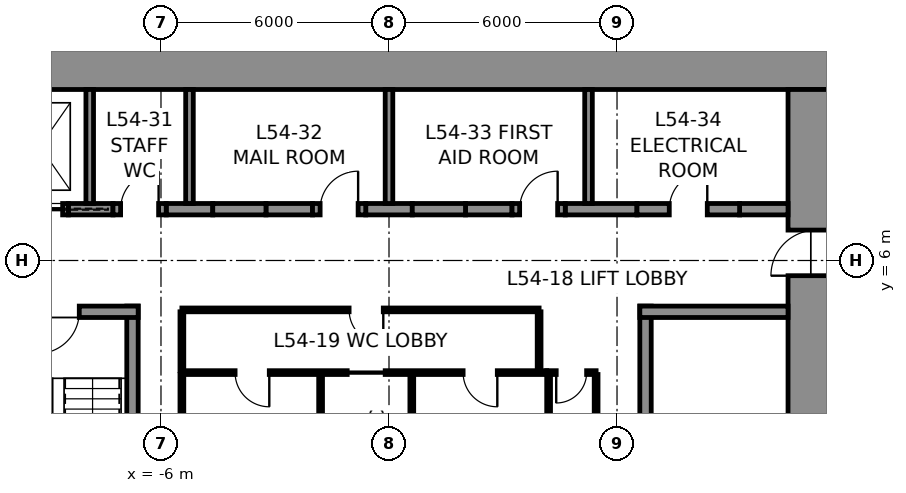
"""IFC4 building model, lengths in metres.
Left out: names, types, materials, properties, quantities, classifications, styles, units other than length and angle.
Written with IfcOpenShell. Run it as: python <this file> out.ifc"""

import sys

from ifc_helpers import new_model, si_unit, direction, frame, frame_2d, origin, place, context, subcontext, project, spatial, rectangle, extrude, element, fill, save


model = new_model("IFC4")
c1 = context("Model", 3, precision=1e-05, world=origin(), true_north=direction((0.0, 1.0)))
c2 = subcontext(c1, "Body", "Model", "MODEL_VIEW")
j1 = project(units=[si_unit("LENGTHUNIT", "METRE"), si_unit("PLANEANGLEUNIT", "RADIAN")], contexts=[c1])
p1 = place(None, origin())
s1 = spatial("IfcSite", under=j1, at=p1, CompositionType="ELEMENT")
p2 = place(p1, origin())
s2 = spatial("IfcBuilding", under=s1, at=p2, CompositionType="ELEMENT")
p3 = place(p2, frame((0.0, 0.0, 245.8)))
s3 = spatial("IfcBuildingStorey", under=s2, at=p3, CompositionType="ELEMENT", Elevation=245.8)
p4 = place(p3, frame((-12.0, 11.25, 0.0), z_axis=(0.0, 0.0, 1.0), x_axis=(1.0, 0.0, 0.0)))
e1 = element("IfcWall", 1, at=p4, inside=s3, PredefinedType="SHEAR", context=c2, shape_type="SweptSolid", body=[
    extrude(rectangle(XDim=24.0, YDim=1.5, at=frame_2d((12.0, 0.0))), origin(), (0.0, 0.0, 1.0), 4.0),
])
p5 = place(p3, frame((11.25, 10.5, 0.0), z_axis=(0.0, 0.0, 1.0), x_axis=(0.0, -1.0, 0.0)))
e2 = element("IfcWall", 2, at=p5, inside=s3, PredefinedType="SHEAR", context=c2, shape_type="SweptSolid", body=[
    extrude(rectangle(XDim=21.0, YDim=1.5, at=frame_2d((10.5, 0.0))), origin(), (0.0, 0.0, 1.0), 4.0),
])
p6 = place(p5, frame((3.7, 0.0, 0.0)))
e3 = element("IfcOpeningElement", 3, at=p6, cuts=e2, PredefinedType="OPENING", context=c2, shape_type="SweptSolid", body=[
    extrude(rectangle(XDim=1.2, YDim=2.3, at=frame_2d((0.6, 1.15))), frame((0.0, 0.76, 0.0), z_axis=(0.0, -1.0, 0.0), x_axis=(1.0, 0.0, 0.0)), (0.0, 0.0, 1.0), 1.52),
])
p7 = place(p5, frame((16.1, 0.0, 0.0)))
e4 = element("IfcOpeningElement", 4, at=p7, cuts=e2, PredefinedType="OPENING", context=c2, shape_type="SweptSolid", body=[
    extrude(rectangle(XDim=1.2, YDim=2.3, at=frame_2d((0.6, 1.15))), frame((0.0, 0.76, 0.0), z_axis=(0.0, -1.0, 0.0), x_axis=(1.0, 0.0, 0.0)), (0.0, 0.0, 1.0), 1.52),
])
p8 = place(p3, frame((-8.438, 7.35, 0.0), z_axis=(0.0, 0.0, 1.0), x_axis=(1.0, 0.0, 0.0)))
e5 = element("IfcWall", 5, at=p8, inside=s3, PredefinedType="SHEAR", context=c2, shape_type="SweptSolid", body=[
    extrude(rectangle(XDim=1.175, YDim=0.3, at=frame_2d((0.587, 0.0))), origin(), (0.0, 0.0, 1.0), 4.0),
])
for number, where, z_axis, x_axis in (
    (6, (-5.863, 7.35, 0.0), (0.0, 0.0, 1.0), (1.0, 0.0, 0.0)),
    (7, (-3.238, 7.35, 0.0), (0.0, 0.0, 1.0), (1.0, 0.0, 0.0)),
    (8, (-0.613, 7.35, 0.0), (0.0, 0.0, 1.0), (1.0, 0.0, 0.0)),
    (9, (2.012, 7.35, 0.0), (0.0, 0.0, 1.0), (1.0, 0.0, 0.0)),
):
    element("IfcWall", number, at=place(p3, frame(where, z_axis=z_axis, x_axis=x_axis)), inside=s3, PredefinedType="SHEAR", context=c2, shape_type="SweptSolid", body=[
        extrude(rectangle(XDim=1.225, YDim=0.3, at=frame_2d((0.613, 0.0))), origin(), (0.0, 0.0, 1.0), 4.0),
    ])
p9 = place(p3, frame((4.637, 7.35, 0.0), z_axis=(0.0, 0.0, 1.0), x_axis=(1.0, 0.0, 0.0)))
e10 = element("IfcWall", 10, at=p9, inside=s3, PredefinedType="SHEAR", context=c2, shape_type="SweptSolid", body=[
    extrude(rectangle(XDim=1.887, YDim=0.3, at=frame_2d((0.944, 0.0))), origin(), (0.0, 0.0, 1.0), 4.0),
])
p10 = place(p3, frame((9.225, 7.35, 0.0), z_axis=(0.0, 0.0, 1.0), x_axis=(1.0, 0.0, 0.0)))
e11 = element("IfcWall", 11, at=p10, inside=s3, PredefinedType="SHEAR", context=c2, shape_type="SweptSolid", body=[
    extrude(rectangle(XDim=1.275, YDim=0.3, at=frame_2d((0.637, 0.0))), origin(), (0.0, 0.0, 1.0), 4.0),
])
p11 = place(p3, frame((-9.938, 7.35, 0.0), z_axis=(0.0, 0.0, 1.0), x_axis=(1.0, 0.0, 0.0)))
e12 = element("IfcWall", 12, at=p11, inside=s3, PredefinedType="PARTITIONING", context=c2, shape_type="SweptSolid", body=[
    extrude(rectangle(XDim=1.5, YDim=0.3, at=frame_2d((0.75, 0.0))), origin(), (0.0, 0.0, 1.0), 4.0),
])
p12 = place(p11, frame((0.15, 0.0, 0.0)))
e13 = element("IfcOpeningElement", 13, at=p12, cuts=e12, PredefinedType="OPENING", context=c2, shape_type="SweptSolid", body=[
    extrude(rectangle(XDim=1.2, YDim=2.3, at=frame_2d((0.6, 1.15))), frame((0.0, 0.16, 0.0), z_axis=(0.0, -1.0, 0.0), x_axis=(1.0, 0.0, 0.0)), (0.0, 0.0, 1.0), 0.32),
])
p13 = place(p3, frame((-7.262, 7.35, 0.0), z_axis=(0.0, 0.0, 1.0), x_axis=(1.0, 0.0, 0.0)))
e14 = element("IfcWall", 14, at=p13, inside=s3, PredefinedType="PARTITIONING", context=c2, shape_type="SweptSolid", body=[
    extrude(rectangle(XDim=1.4, YDim=0.3, at=frame_2d((0.7, 0.0))), origin(), (0.0, 0.0, 1.0), 4.0),
])
p14 = place(p13, frame((0.2, 0.0, 0.0)))
e15 = element("IfcOpeningElement", 15, at=p14, cuts=e14, PredefinedType="OPENING", context=c2, shape_type="SweptSolid", body=[
    extrude(rectangle(XDim=1.0, YDim=2.3, at=frame_2d((0.5, 1.15))), frame((0.0, 0.16, 0.0), z_axis=(0.0, -1.0, 0.0), x_axis=(1.0, 0.0, 0.0)), (0.0, 0.0, 1.0), 0.32),
])
p15 = place(p3, frame((-4.637, 7.35, 0.0), z_axis=(0.0, 0.0, 1.0), x_axis=(1.0, 0.0, 0.0)))
e16 = element("IfcWall", 16, at=p15, inside=s3, PredefinedType="PARTITIONING", context=c2, shape_type="SweptSolid", body=[
    extrude(rectangle(XDim=1.4, YDim=0.3, at=frame_2d((0.7, 0.0))), origin(), (0.0, 0.0, 1.0), 4.0),
])
p16 = place(p3, frame((-2.012, 7.35, 0.0), z_axis=(0.0, 0.0, 1.0), x_axis=(1.0, 0.0, 0.0)))
e17 = element("IfcWall", 17, at=p16, inside=s3, PredefinedType="PARTITIONING", context=c2, shape_type="SweptSolid", body=[
    extrude(rectangle(XDim=1.4, YDim=0.3, at=frame_2d((0.7, 0.0))), origin(), (0.0, 0.0, 1.0), 4.0),
])
p17 = place(p16, frame((0.2, 0.0, 0.0)))
e18 = element("IfcOpeningElement", 18, at=p17, cuts=e17, PredefinedType="OPENING", context=c2, shape_type="SweptSolid", body=[
    extrude(rectangle(XDim=1.0, YDim=2.3, at=frame_2d((0.5, 1.15))), frame((0.0, 0.16, 0.0), z_axis=(0.0, -1.0, 0.0), x_axis=(1.0, 0.0, 0.0)), (0.0, 0.0, 1.0), 0.32),
])
p18 = place(p3, frame((0.613, 7.35, 0.0), z_axis=(0.0, 0.0, 1.0), x_axis=(1.0, 0.0, 0.0)))
e19 = element("IfcWall", 19, at=p18, inside=s3, PredefinedType="PARTITIONING", context=c2, shape_type="SweptSolid", body=[
    extrude(rectangle(XDim=1.4, YDim=0.3, at=frame_2d((0.7, 0.0))), origin(), (0.0, 0.0, 1.0), 4.0),
])
p19 = place(p3, frame((3.238, 7.35, 0.0), z_axis=(0.0, 0.0, 1.0), x_axis=(1.0, 0.0, 0.0)))
e20 = element("IfcWall", 20, at=p19, inside=s3, PredefinedType="PARTITIONING", context=c2, shape_type="SweptSolid", body=[
    extrude(rectangle(XDim=1.4, YDim=0.3, at=frame_2d((0.7, 0.0))), origin(), (0.0, 0.0, 1.0), 4.0),
])
p20 = place(p19, frame((0.2, 0.0, 0.0)))
e21 = element("IfcOpeningElement", 21, at=p20, cuts=e20, PredefinedType="OPENING", context=c2, shape_type="SweptSolid", body=[
    extrude(rectangle(XDim=1.0, YDim=2.3, at=frame_2d((0.5, 1.15))), frame((0.0, 0.16, 0.0), z_axis=(0.0, -1.0, 0.0), x_axis=(1.0, 0.0, 0.0)), (0.0, 0.0, 1.0), 0.32),
])
p21 = place(p3, frame((6.525, 7.35, 0.0), z_axis=(0.0, 0.0, 1.0), x_axis=(1.0, 0.0, 0.0)))
e22 = element("IfcWall", 22, at=p21, inside=s3, PredefinedType="PARTITIONING", context=c2, shape_type="SweptSolid", body=[
    extrude(rectangle(XDim=2.7, YDim=0.3, at=frame_2d((1.35, 0.0))), origin(), (0.0, 0.0, 1.0), 4.0),
])
p22 = place(p21, frame((0.85, 0.0, 0.0)))
e23 = element("IfcOpeningElement", 23, at=p22, cuts=e22, PredefinedType="OPENING", context=c2, shape_type="SweptSolid", body=[
    extrude(rectangle(XDim=1.0, YDim=2.3, at=frame_2d((0.5, 1.15))), frame((0.0, 0.16, 0.0), z_axis=(0.0, -1.0, 0.0), x_axis=(1.0, 0.0, 0.0)), (0.0, 0.0, 1.0), 0.32),
])
for number, where, z_axis, x_axis in (
    (24, (-7.875, 7.5, 0.0), (0.0, 0.0, 1.0), (0.0, 1.0, 0.0)),
    (25, (-5.25, 7.5, 0.0), (0.0, 0.0, 1.0), (0.0, 1.0, 0.0)),
    (26, (0.0, 7.5, 0.0), (0.0, 0.0, 1.0), (0.0, 1.0, 0.0)),
    (27, (5.25, 7.5, 0.0), (0.0, 0.0, 1.0), (0.0, 1.0, 0.0)),
):
    element("IfcWall", number, at=place(p3, frame(where, z_axis=z_axis, x_axis=x_axis)), inside=s3, PredefinedType="PARTITIONING", context=c2, shape_type="SweptSolid", body=[
        extrude(rectangle(XDim=3.0, YDim=0.2, at=frame_2d((1.5, 0.0))), origin(), (0.0, 0.0, 1.0), 4.0),
    ])
p23 = place(p3, frame((-6.75, -4.8, 0.0), z_axis=(0.0, 0.0, 1.0), x_axis=(0.0, 1.0, 0.0)))
e28 = element("IfcWall", 28, at=p23, inside=s3, PredefinedType="SOLIDWALL", context=c2, shape_type="SweptSolid", body=[
    extrude(rectangle(XDim=9.6, YDim=0.3, at=frame_2d((4.8, 0.0))), origin(), (0.0, 0.0, 1.0), 3.75),
])
p24 = place(p3, frame((-10.5, 4.65, 0.0), z_axis=(0.0, 0.0, 1.0), x_axis=(1.0, 0.0, 0.0)))
e29 = element("IfcWall", 29, at=p24, inside=s3, PredefinedType="SOLIDWALL", context=c2, shape_type="SweptSolid", body=[
    extrude(rectangle(XDim=3.9, YDim=0.3, at=frame_2d((1.95, 0.0))), origin(), (0.0, 0.0, 1.0), 3.75),
])
p25 = place(p24, frame((1.25, 0.0, 0.0)))
e30 = element("IfcOpeningElement", 30, at=p25, cuts=e29, PredefinedType="OPENING", context=c2, shape_type="SweptSolid", body=[
    extrude(rectangle(XDim=1.1, YDim=2.3, at=frame_2d((0.55, 1.15))), frame((0.0, 0.16, 0.0), z_axis=(0.0, -1.0, 0.0), x_axis=(1.0, 0.0, 0.0)), (0.0, 0.0, 1.0), 0.32),
])
p26 = place(p3, frame((6.75, -4.8, 0.0), z_axis=(0.0, 0.0, 1.0), x_axis=(0.0, 1.0, 0.0)))
e31 = element("IfcWall", 31, at=p26, inside=s3, PredefinedType="SOLIDWALL", context=c2, shape_type="SweptSolid", body=[
    extrude(rectangle(XDim=9.6, YDim=0.3, at=frame_2d((4.8, 0.0))), origin(), (0.0, 0.0, 1.0), 3.75),
])
p27 = place(p3, frame((6.6, 4.65, 0.0), z_axis=(0.0, 0.0, 1.0), x_axis=(1.0, 0.0, 0.0)))
e32 = element("IfcWall", 32, at=p27, inside=s3, PredefinedType="SOLIDWALL", context=c2, shape_type="SweptSolid", body=[
    extrude(rectangle(XDim=3.9, YDim=0.3, at=frame_2d((1.95, 0.0))), origin(), (0.0, 0.0, 1.0), 3.75),
])
p28 = place(p3, frame((-5.45, 3.05, 0.0), z_axis=(0.0, 0.0, 1.0), x_axis=(1.0, 0.0, 0.0)))
e33 = element("IfcWall", 33, at=p28, inside=s3, PredefinedType="PARTITIONING", context=c2, shape_type="SweptSolid", body=[
    extrude(rectangle(XDim=9.6, YDim=0.1, at=frame_2d((4.8, 0.0))), origin(), (0.0, 0.0, 1.0), 3.75),
])
p29 = place(p28, frame((1.4, 0.0, 0.0)))
e34 = element("IfcOpeningElement", 34, at=p29, cuts=e33, PredefinedType="OPENING", context=c2, shape_type="SweptSolid", body=[
    extrude(rectangle(XDim=0.9, YDim=2.3, at=frame_2d((0.45, 1.15))), frame((0.0, 0.06, 0.0), z_axis=(0.0, -1.0, 0.0), x_axis=(1.0, 0.0, 0.0)), (0.0, 0.0, 1.0), 0.12),
])
p30 = place(p28, frame((4.35, 0.0, 0.0)))
e35 = element("IfcOpeningElement", 35, at=p30, cuts=e33, PredefinedType="OPENING", context=c2, shape_type="SweptSolid", body=[
    extrude(rectangle(XDim=1.0, YDim=2.3, at=frame_2d((0.5, 1.15))), frame((0.0, 0.06, 0.0), z_axis=(0.0, -1.0, 0.0), x_axis=(1.0, 0.0, 0.0)), (0.0, 0.0, 1.0), 0.12),
])
p31 = place(p28, frame((7.4, 0.0, 0.0)))
e36 = element("IfcOpeningElement", 36, at=p31, cuts=e33, PredefinedType="OPENING", context=c2, shape_type="SweptSolid", body=[
    extrude(rectangle(XDim=0.9, YDim=2.3, at=frame_2d((0.45, 1.15))), frame((0.0, 0.06, 0.0), z_axis=(0.0, -1.0, 0.0), x_axis=(1.0, 0.0, 0.0)), (0.0, 0.0, 1.0), 0.12),
])
p32 = place(p3, frame((4.15, 3.05, 0.0), z_axis=(0.0, 0.0, 1.0), x_axis=(1.0, 0.0, 0.0)))
e37 = element("IfcWall", 37, at=p32, inside=s3, PredefinedType="PARTITIONING", context=c2, shape_type="SweptSolid", body=[
    extrude(rectangle(XDim=1.3, YDim=0.1, at=frame_2d((0.65, 0.0))), origin(), (0.0, 0.0, 1.0), 3.75),
])
p33 = place(p32, frame((0.25, 0.0, 0.0)))
e38 = element("IfcOpeningElement", 38, at=p33, cuts=e37, PredefinedType="OPENING", context=c2, shape_type="SweptSolid", body=[
    extrude(rectangle(XDim=0.8, YDim=2.3, at=frame_2d((0.4, 1.15))), frame((0.0, 0.06, 0.0), z_axis=(0.0, -1.0, 0.0), x_axis=(1.0, 0.0, 0.0)), (0.0, 0.0, 1.0), 0.12),
])
for number, where, z_axis, x_axis in (
    (39, (5.45, 3.0, 0.0), (0.0, 0.0, 1.0), (0.0, -1.0, 0.0)),
    (40, (-5.45, -3.0, 0.0), (0.0, 0.0, 1.0), (0.0, 1.0, 0.0)),
    (41, (-1.8, -3.0, 0.0), (0.0, 0.0, 1.0), (0.0, 1.0, 0.0)),
    (42, (0.6, -3.0, 0.0), (0.0, 0.0, 1.0), (0.0, 1.0, 0.0)),
    (43, (4.2, -3.0, 0.0), (0.0, 0.0, 1.0), (0.0, 1.0, 0.0)),
):
    element("IfcWall", number, at=place(p3, frame(where, z_axis=z_axis, x_axis=x_axis)), inside=s3, PredefinedType="PARTITIONING", context=c2, shape_type="SweptSolid", body=[
        extrude(rectangle(XDim=6.0, YDim=0.1, at=frame_2d((3.0, 0.0))), origin(), (0.0, 0.0, 1.0), 3.75),
    ])
p34 = place(p3, frame((-5.45, 4.7, 0.0), z_axis=(0.0, 0.0, 1.0), x_axis=(1.0, 0.0, 0.0)))
e44 = element("IfcWall", 44, at=p34, inside=s3, PredefinedType="PARTITIONING", context=c2, shape_type="SweptSolid", body=[
    extrude(rectangle(XDim=9.4, YDim=0.1, at=frame_2d((4.7, 0.0))), origin(), (0.0, 0.0, 1.0), 3.75),
])
p35 = place(p34, frame((4.4, 0.0, 0.0)))
e45 = element("IfcOpeningElement", 45, at=p35, cuts=e44, PredefinedType="OPENING", context=c2, shape_type="SweptSolid", body=[
    extrude(rectangle(XDim=0.9, YDim=2.3, at=frame_2d((0.45, 1.15))), frame((0.0, 0.06, 0.0), z_axis=(0.0, -1.0, 0.0), x_axis=(1.0, 0.0, 0.0)), (0.0, 0.0, 1.0), 0.12),
])
for number, where, z_axis, x_axis in (
    (46, (-5.45, 3.1, 0.0), (0.0, 0.0, 1.0), (0.0, 1.0, 0.0)),
    (47, (3.95, 3.1, 0.0), (0.0, 0.0, 1.0), (0.0, 1.0, 0.0)),
):
    element("IfcWall", number, at=place(p3, frame(where, z_axis=z_axis, x_axis=x_axis)), inside=s3, PredefinedType="PARTITIONING", context=c2, shape_type="SweptSolid", body=[
        extrude(rectangle(XDim=1.55, YDim=0.1, at=frame_2d((0.775, 0.0))), origin(), (0.0, 0.0, 1.0), 3.75),
    ])
p36 = place(p25, frame((1.1, 0.0, 0.0), z_axis=(0.0, 0.0, 1.0), x_axis=(-1.0, 0.0, 0.0)))
e48 = element("IfcDoor", 48, at=p36, inside=s3, OperationType="SINGLE_SWING_RIGHT", PredefinedType="DOOR", context=c2, shape_type="SweptSolid", body=[
    extrude(rectangle(XDim=1.1, YDim=2.3, at=frame_2d((0.55, 1.15))), frame((0.0, 0.025, 0.0), z_axis=(0.0, -1.0, 0.0), x_axis=(1.0, 0.0, 0.0)), (0.0, 0.0, 1.0), 0.05),
])
fill(e30, e48)
p37 = place(p29, frame((0.9, 0.0, 0.0), z_axis=(0.0, 0.0, 1.0), x_axis=(-1.0, 0.0, 0.0)))
e49 = element("IfcDoor", 49, at=p37, inside=s3, OperationType="SINGLE_SWING_LEFT", PredefinedType="DOOR", context=c2, shape_type="SweptSolid", body=[
    extrude(rectangle(XDim=0.9, YDim=2.3, at=frame_2d((0.45, 1.15))), frame((0.0, 0.025, 0.0), z_axis=(0.0, -1.0, 0.0), x_axis=(1.0, 0.0, 0.0)), (0.0, 0.0, 1.0), 0.05),
])
fill(e34, e49)
p38 = place(p30, frame((1.0, 0.0, 0.0), z_axis=(0.0, 0.0, 1.0), x_axis=(-1.0, 0.0, 0.0)))
e50 = element("IfcDoor", 50, at=p38, inside=s3, OperationType="SLIDING_TO_LEFT", PredefinedType="DOOR", context=c2, shape_type="SweptSolid", body=[
    extrude(rectangle(XDim=1.0, YDim=2.3, at=frame_2d((0.5, 1.15))), frame((0.0, 0.025, 0.0), z_axis=(0.0, -1.0, 0.0), x_axis=(1.0, 0.0, 0.0)), (0.0, 0.0, 1.0), 0.05),
])
fill(e35, e50)
p39 = place(p31, frame((0.9, 0.0, 0.0), z_axis=(0.0, 0.0, 1.0), x_axis=(-1.0, 0.0, 0.0)))
e51 = element("IfcDoor", 51, at=p39, inside=s3, OperationType="SINGLE_SWING_LEFT", PredefinedType="DOOR", context=c2, shape_type="SweptSolid", body=[
    extrude(rectangle(XDim=0.9, YDim=2.3, at=frame_2d((0.45, 1.15))), frame((0.0, 0.025, 0.0), z_axis=(0.0, -1.0, 0.0), x_axis=(1.0, 0.0, 0.0)), (0.0, 0.0, 1.0), 0.05),
])
fill(e36, e51)
p40 = place(p33, frame((0.8, 0.0, 0.0), z_axis=(0.0, 0.0, 1.0), x_axis=(-1.0, 0.0, 0.0)))
e52 = element("IfcDoor", 52, at=p40, inside=s3, OperationType="SINGLE_SWING_RIGHT", PredefinedType="DOOR", context=c2, shape_type="SweptSolid", body=[
    extrude(rectangle(XDim=0.8, YDim=2.3, at=frame_2d((0.4, 1.15))), frame((0.0, 0.025, 0.0), z_axis=(0.0, -1.0, 0.0), x_axis=(1.0, 0.0, 0.0)), (0.0, 0.0, 1.0), 0.05),
])
fill(e38, e52)
p41 = place(p35, frame((0.9, 0.0, 0.0), z_axis=(0.0, 0.0, 1.0), x_axis=(-1.0, 0.0, 0.0)))
e53 = element("IfcDoor", 53, at=p41, inside=s3, OperationType="SINGLE_SWING_LEFT", PredefinedType="DOOR", context=c2, shape_type="SweptSolid", body=[
    extrude(rectangle(XDim=0.9, YDim=2.3, at=frame_2d((0.45, 1.15))), frame((0.0, 0.025, 0.0), z_axis=(0.0, -1.0, 0.0), x_axis=(1.0, 0.0, 0.0)), (0.0, 0.0, 1.0), 0.05),
])
fill(e45, e53)
p42 = place(p14, origin())
e54 = element("IfcDoor", 54, at=p42, inside=s3, OperationType="SINGLE_SWING_RIGHT", PredefinedType="DOOR", context=c2, shape_type="SweptSolid", body=[
    extrude(rectangle(XDim=1.0, YDim=2.3, at=frame_2d((0.5, 1.15))), frame((0.0, 0.025, 0.0), z_axis=(0.0, -1.0, 0.0), x_axis=(1.0, 0.0, 0.0)), (0.0, 0.0, 1.0), 0.05),
])
fill(e15, e54)
p43 = place(p17, origin())
e55 = element("IfcDoor", 55, at=p43, inside=s3, OperationType="SINGLE_SWING_RIGHT", PredefinedType="DOOR", context=c2, shape_type="SweptSolid", body=[
    extrude(rectangle(XDim=1.0, YDim=2.3, at=frame_2d((0.5, 1.15))), frame((0.0, 0.025, 0.0), z_axis=(0.0, -1.0, 0.0), x_axis=(1.0, 0.0, 0.0)), (0.0, 0.0, 1.0), 0.05),
])
fill(e18, e55)
p44 = place(p20, origin())
e56 = element("IfcDoor", 56, at=p44, inside=s3, OperationType="SINGLE_SWING_RIGHT", PredefinedType="DOOR", context=c2, shape_type="SweptSolid", body=[
    extrude(rectangle(XDim=1.0, YDim=2.3, at=frame_2d((0.5, 1.15))), frame((0.0, 0.025, 0.0), z_axis=(0.0, -1.0, 0.0), x_axis=(1.0, 0.0, 0.0)), (0.0, 0.0, 1.0), 0.05),
])
fill(e21, e56)
p45 = place(p22, origin())
e57 = element("IfcDoor", 57, at=p45, inside=s3, OperationType="SINGLE_SWING_RIGHT", PredefinedType="DOOR", context=c2, shape_type="SweptSolid", body=[
    extrude(rectangle(XDim=1.0, YDim=2.3, at=frame_2d((0.5, 1.15))), frame((0.0, 0.025, 0.0), z_axis=(0.0, -1.0, 0.0), x_axis=(1.0, 0.0, 0.0)), (0.0, 0.0, 1.0), 0.05),
])
fill(e23, e57)
p46 = place(p6, frame((1.2, 0.0, 0.0), z_axis=(0.0, 0.0, 1.0), x_axis=(-1.0, 0.0, 0.0)))
e58 = element("IfcDoor", 58, at=p46, inside=s3, OperationType="SINGLE_SWING_LEFT", PredefinedType="DOOR", context=c2, shape_type="SweptSolid", body=[
    extrude(rectangle(XDim=1.2, YDim=2.3, at=frame_2d((0.6, 1.15))), frame((0.0, 0.025, 0.0), z_axis=(0.0, -1.0, 0.0), x_axis=(1.0, 0.0, 0.0)), (0.0, 0.0, 1.0), 0.05),
])
fill(e3, e58)
p47 = place(p12, frame((1.2, 0.0, 0.0), z_axis=(0.0, 0.0, 1.0), x_axis=(-1.0, 0.0, 0.0)))
e59 = element("IfcDoor", 59, at=p47, inside=s3, OperationType="SLIDING_TO_LEFT", PredefinedType="DOOR", context=c2, shape_type="SweptSolid", body=[
    extrude(rectangle(XDim=1.2, YDim=2.3, at=frame_2d((0.6, 1.15))), frame((0.0, 0.025, 0.0), z_axis=(0.0, -1.0, 0.0), x_axis=(1.0, 0.0, 0.0)), (0.0, 0.0, 1.0), 0.05),
])
fill(e13, e59)
save(model, sys.argv[1])
